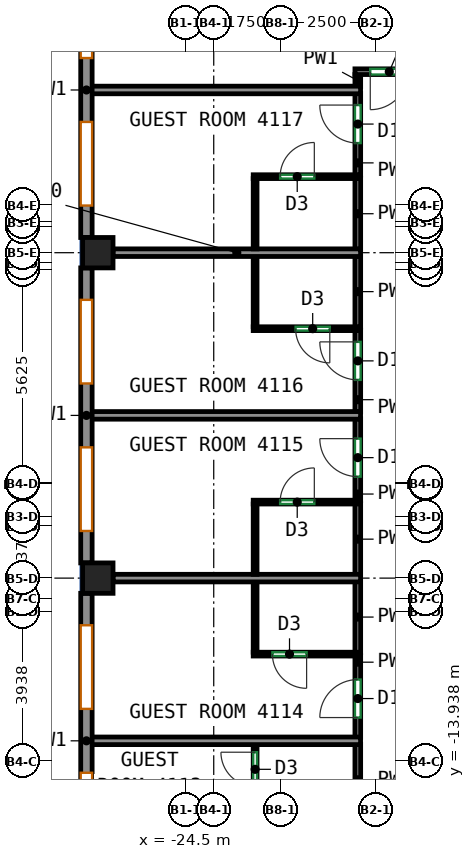
"""IFC4 building model, lengths in metres.
Left out: names, types, materials, properties, quantities, classifications, styles, units other than length and angle.
Written with IfcOpenShell. Run it as: python <this file> out.ifc"""

import sys

from ifc_helpers import new_model, si_unit, direction, frame, frame_2d, origin, origin_2d, place, context, subcontext, project, spatial, rectangle, extrude, source, transform, mapped, element, fill, save


model = new_model("IFC4")
c1 = context("Model", 3, precision=1e-05, world=origin(), true_north=direction((0.0, 1.0)))
c2 = subcontext(c1, "Body", "Model", "MODEL_VIEW")
j1 = project(units=[si_unit("LENGTHUNIT", "METRE"), si_unit("PLANEANGLEUNIT", "RADIAN")], contexts=[c1])
p1 = place(None, origin())
s1 = spatial("IfcSite", under=j1, at=p1, CompositionType="ELEMENT")
p2 = place(p1, origin())
s2 = spatial("IfcBuilding", under=s1, at=p2, CompositionType="ELEMENT")
p3 = place(p2, frame((0.0, 0.0, 175.3)))
s3 = spatial("IfcBuildingStorey", under=s2, at=p3, CompositionType="ELEMENT", Elevation=175.3)
m1 = source(origin(), c2, "Body", "SweptSolid", [
    extrude(rectangle(XDim=0.8, YDim=0.8, at=origin_2d()), origin(), (0.0, 0.0, 1.0), 3.12),
])
for number, where, z_axis, x_axis in (
    (1, (-26.8, -9.125, 0.0), (0.0, 0.0, 1.0), (1.0, 0.0, 0.0)),
    (2, (-26.8, -0.562, 0.0), (0.0, 0.0, 1.0), (1.0, 0.0, 0.0)),
):
    element("IfcColumn", number, at=place(p3, frame(where, z_axis=z_axis, x_axis=x_axis)), inside=s3, PredefinedType="COLUMN", context=c2, shape_type="MappedRepresentation", body=[
        mapped(m1, transform((0.0, 0.0, 0.0))),
    ])
m2 = source(origin(), c2, "Body", "SweptSolid", [
    extrude(rectangle(XDim=7.763, YDim=0.3, at=frame_2d((3.881, 0.0))), origin(), (0.0, 0.0, 1.0), 3.12),
])
p4 = place(p3, frame((-27.1, 7.6, 0.0), z_axis=(0.0, 0.0, 1.0), x_axis=(0.0, -1.0, 0.0)))
e3 = element("IfcWall", 3, at=p4, inside=s3, PredefinedType="SOLIDWALL", context=c2, shape_type="MappedRepresentation", body=[
    mapped(m2, transform((0.0, 0.0, 0.0))),
])
p5 = place(p4, frame((0.841, 0.0, 0.85)))
e4 = element("IfcOpeningElement", 4, at=p5, cuts=e3, PredefinedType="OPENING", context=c2, shape_type="SweptSolid", body=[
    extrude(rectangle(XDim=2.2, YDim=1.95, at=frame_2d((1.1, 0.975))), frame((0.0, 0.16, 0.0), z_axis=(0.0, -1.0, 0.0), x_axis=(1.0, 0.0, 0.0)), (0.0, 0.0, 1.0), 0.32),
])
p6 = place(p4, frame((4.722, 0.0, 0.85)))
e5 = element("IfcOpeningElement", 5, at=p6, cuts=e3, PredefinedType="OPENING", context=c2, shape_type="SweptSolid", body=[
    extrude(rectangle(XDim=2.2, YDim=1.95, at=frame_2d((1.1, 0.975))), frame((0.0, 0.16, 0.0), z_axis=(0.0, -1.0, 0.0), x_axis=(1.0, 0.0, 0.0)), (0.0, 0.0, 1.0), 0.32),
])
p7 = place(p3, frame((-27.1, -0.962, 0.0), z_axis=(0.0, 0.0, 1.0), x_axis=(0.0, -1.0, 0.0)))
e6 = element("IfcWall", 6, at=p7, inside=s3, PredefinedType="SOLIDWALL", context=c2, shape_type="MappedRepresentation", body=[
    mapped(m2, transform((0.0, 0.0, 0.0))),
])
p8 = place(p7, frame((0.841, 0.0, 0.85)))
e7 = element("IfcOpeningElement", 7, at=p8, cuts=e6, PredefinedType="OPENING", context=c2, shape_type="SweptSolid", body=[
    extrude(rectangle(XDim=2.2, YDim=1.95, at=frame_2d((1.1, 0.975))), frame((0.0, 0.16, 0.0), z_axis=(0.0, -1.0, 0.0), x_axis=(1.0, 0.0, 0.0)), (0.0, 0.0, 1.0), 0.32),
])
p9 = place(p7, frame((4.722, 0.0, 0.85)))
e8 = element("IfcOpeningElement", 8, at=p9, cuts=e6, PredefinedType="OPENING", context=c2, shape_type="SweptSolid", body=[
    extrude(rectangle(XDim=2.2, YDim=1.95, at=frame_2d((1.1, 0.975))), frame((0.0, 0.16, 0.0), z_axis=(0.0, -1.0, 0.0), x_axis=(1.0, 0.0, 0.0)), (0.0, 0.0, 1.0), 0.32),
])
p10 = place(p3, frame((-27.1, -9.525, 0.0), z_axis=(0.0, 0.0, 1.0), x_axis=(0.0, -1.0, 0.0)))
e9 = element("IfcWall", 9, at=p10, inside=s3, PredefinedType="SOLIDWALL", context=c2, shape_type="MappedRepresentation", body=[
    mapped(m2, transform((0.0, 0.0, 0.0))),
])
p11 = place(p10, frame((0.841, 0.0, 0.85)))
e10 = element("IfcOpeningElement", 10, at=p11, cuts=e9, PredefinedType="OPENING", context=c2, shape_type="SweptSolid", body=[
    extrude(rectangle(XDim=2.2, YDim=1.95, at=frame_2d((1.1, 0.975))), frame((0.0, 0.16, 0.0), z_axis=(0.0, -1.0, 0.0), x_axis=(1.0, 0.0, 0.0)), (0.0, 0.0, 1.0), 0.32),
])
p12 = place(p10, frame((4.722, 0.0, 0.85)))
e11 = element("IfcOpeningElement", 11, at=p12, cuts=e9, PredefinedType="OPENING", context=c2, shape_type="SweptSolid", body=[
    extrude(rectangle(XDim=2.2, YDim=1.95, at=frame_2d((1.1, 0.975))), frame((0.0, 0.16, 0.0), z_axis=(0.0, -1.0, 0.0), x_axis=(1.0, 0.0, 0.0)), (0.0, 0.0, 1.0), 0.32),
])
p13 = place(p3, frame((-19.959, -15.366, 0.0), z_axis=(0.0, 0.0, 1.0), x_axis=(0.0, 1.0, 0.0)))
e12 = element("IfcWall", 12, at=p13, inside=s3, PredefinedType="PARTITIONING", context=c2, shape_type="SweptSolid", body=[
    extrude(rectangle(XDim=1.87, YDim=0.15, at=frame_2d((0.935, 0.0))), origin(), (0.0, 0.0, 1.0), 3.12),
])
p14 = place(p3, frame((-19.959, -13.316, 0.0), z_axis=(0.0, 0.0, 1.0), x_axis=(0.0, 1.0, 0.0)))
e13 = element("IfcWall", 13, at=p14, inside=s3, PredefinedType="PARTITIONING", context=c2, shape_type="SweptSolid", body=[
    extrude(rectangle(XDim=2.151, YDim=0.15, at=frame_2d((1.075, 0.0))), origin(), (0.0, 0.0, 1.0), 3.12),
])
p15 = place(p14, frame((0.522, 0.0, 0.0)))
e14 = element("IfcOpeningElement", 14, at=p15, cuts=e13, PredefinedType="OPENING", context=c2, shape_type="SweptSolid", body=[
    extrude(rectangle(XDim=1.0, YDim=2.1, at=frame_2d((0.5, 1.05))), frame((0.0, 0.085, 0.0), z_axis=(0.0, -1.0, 0.0), x_axis=(1.0, 0.0, 0.0)), (0.0, 0.0, 1.0), 0.17),
])
p16 = place(p3, frame((-19.959, -11.085, 0.0), z_axis=(0.0, 0.0, 1.0), x_axis=(0.0, 1.0, 0.0)))
e15 = element("IfcWall", 15, at=p16, inside=s3, PredefinedType="PARTITIONING", context=c2, shape_type="SweptSolid", body=[
    extrude(rectangle(XDim=1.87, YDim=0.15, at=frame_2d((0.935, 0.0))), origin(), (0.0, 0.0, 1.0), 3.12),
])
p17 = place(p3, frame((-19.959, -7.085, 0.0), z_axis=(0.0, 0.0, 1.0), x_axis=(0.0, 1.0, 0.0)))
e16 = element("IfcWall", 16, at=p17, inside=s3, PredefinedType="PARTITIONING", context=c2, shape_type="SweptSolid", body=[
    extrude(rectangle(XDim=2.152, YDim=0.15, at=frame_2d((1.076, 0.0))), origin(), (0.0, 0.0, 1.0), 3.12),
])
p18 = place(p17, frame((0.63, 0.0, 0.0)))
e17 = element("IfcOpeningElement", 17, at=p18, cuts=e16, PredefinedType="OPENING", context=c2, shape_type="SweptSolid", body=[
    extrude(rectangle(XDim=1.0, YDim=2.1, at=frame_2d((0.5, 1.05))), frame((0.0, 0.085, 0.0), z_axis=(0.0, -1.0, 0.0), x_axis=(1.0, 0.0, 0.0)), (0.0, 0.0, 1.0), 0.17),
])
p19 = place(p3, frame((-19.959, -9.035, 0.0), z_axis=(0.0, 0.0, 1.0), x_axis=(0.0, 1.0, 0.0)))
e18 = element("IfcWall", 18, at=p19, inside=s3, PredefinedType="PARTITIONING", context=c2, shape_type="SweptSolid", body=[
    extrude(rectangle(XDim=1.87, YDim=0.15, at=frame_2d((0.935, 0.0))), origin(), (0.0, 0.0, 1.0), 3.12),
])
p20 = place(p3, frame((-19.959, -4.753, 0.0), z_axis=(0.0, 0.0, 1.0), x_axis=(0.0, 1.0, 0.0)))
e19 = element("IfcWall", 19, at=p20, inside=s3, PredefinedType="PARTITIONING", context=c2, shape_type="SweptSolid", body=[
    extrude(rectangle(XDim=2.151, YDim=0.15, at=frame_2d((1.075, 0.0))), origin(), (0.0, 0.0, 1.0), 3.12),
])
p21 = place(p20, frame((0.844, 0.0, 0.0)))
e20 = element("IfcOpeningElement", 20, at=p21, cuts=e19, PredefinedType="OPENING", context=c2, shape_type="SweptSolid", body=[
    extrude(rectangle(XDim=1.0, YDim=2.1, at=frame_2d((0.5, 1.05))), frame((0.0, 0.085, 0.0), z_axis=(0.0, -1.0, 0.0), x_axis=(1.0, 0.0, 0.0)), (0.0, 0.0, 1.0), 0.17),
])
p22 = place(p3, frame((-19.959, -2.522, 0.0), z_axis=(0.0, 0.0, 1.0), x_axis=(0.0, 1.0, 0.0)))
e21 = element("IfcWall", 21, at=p22, inside=s3, PredefinedType="PARTITIONING", context=c2, shape_type="SweptSolid", body=[
    extrude(rectangle(XDim=1.87, YDim=0.15, at=frame_2d((0.935, 0.0))), origin(), (0.0, 0.0, 1.0), 3.12),
])
p23 = place(p3, frame((-19.959, 1.478, 0.0), z_axis=(0.0, 0.0, 1.0), x_axis=(0.0, 1.0, 0.0)))
e22 = element("IfcWall", 22, at=p23, inside=s3, PredefinedType="PARTITIONING", context=c2, shape_type="SweptSolid", body=[
    extrude(rectangle(XDim=2.151, YDim=0.15, at=frame_2d((1.075, 0.0))), origin(), (0.0, 0.0, 1.0), 3.12),
])
p24 = place(p23, frame((0.844, 0.0, 0.0)))
e23 = element("IfcOpeningElement", 23, at=p24, cuts=e22, PredefinedType="OPENING", context=c2, shape_type="SweptSolid", body=[
    extrude(rectangle(XDim=1.0, YDim=2.1, at=frame_2d((0.5, 1.05))), frame((0.0, 0.085, 0.0), z_axis=(0.0, -1.0, 0.0), x_axis=(1.0, 0.0, 0.0)), (0.0, 0.0, 1.0), 0.17),
])
p25 = place(p3, frame((-19.959, -0.472, 0.0), z_axis=(0.0, 0.0, 1.0), x_axis=(0.0, 1.0, 0.0)))
e24 = element("IfcWall", 24, at=p25, inside=s3, PredefinedType="PARTITIONING", context=c2, shape_type="SweptSolid", body=[
    extrude(rectangle(XDim=1.87, YDim=0.15, at=frame_2d((0.935, 0.0))), origin(), (0.0, 0.0, 1.0), 3.12),
])
p26 = place(p3, frame((-19.959, 3.809, 0.0), z_axis=(0.0, 0.0, 1.0), x_axis=(0.0, 1.0, 0.0)))
e25 = element("IfcWall", 25, at=p26, inside=s3, PredefinedType="PARTITIONING", context=c2, shape_type="SweptSolid", body=[
    extrude(rectangle(XDim=0.316, YDim=0.15, at=frame_2d((0.158, 0.0))), origin(), (0.0, 0.0, 1.0), 3.12),
])
p27 = place(p3, frame((-17.925, 4.2, 0.0), z_axis=(0.0, 0.0, 1.0), x_axis=(-1.0, 0.0, 0.0)))
e26 = element("IfcWall", 26, at=p27, inside=s3, PredefinedType="PARTITIONING", context=c2, shape_type="SweptSolid", body=[
    extrude(rectangle(XDim=2.109, YDim=0.15, at=frame_2d((1.054, 0.0))), origin(), (0.0, 0.0, 1.0), 3.12),
])
p28 = place(p27, frame((0.706, 0.0, 0.0)))
e27 = element("IfcOpeningElement", 27, at=p28, cuts=e26, PredefinedType="OPENING", context=c2, shape_type="SweptSolid", body=[
    extrude(rectangle(XDim=1.0, YDim=2.1, at=frame_2d((0.5, 1.05))), frame((0.0, 0.085, 0.0), z_axis=(0.0, -1.0, 0.0), x_axis=(1.0, 0.0, 0.0)), (0.0, 0.0, 1.0), 0.17),
])
p29 = place(p3, frame((-22.661, -15.356, 0.0), z_axis=(0.0, 0.0, 1.0), x_axis=(0.0, 1.0, 0.0)))
e28 = element("IfcWall", 28, at=p29, inside=s3, PredefinedType="PARTITIONING", context=c2, shape_type="SweptSolid", body=[
    extrude(rectangle(XDim=1.85, YDim=0.1, at=frame_2d((0.925, 0.0))), origin(), (0.0, 0.0, 1.0), 3.12),
])
p30 = place(p29, frame((0.75, 0.0, 0.0)))
e29 = element("IfcOpeningElement", 29, at=p30, cuts=e28, PredefinedType="OPENING", context=c2, shape_type="SweptSolid", body=[
    extrude(rectangle(XDim=0.9, YDim=2.1, at=frame_2d((0.45, 1.05))), frame((0.0, 0.06, 0.0), z_axis=(0.0, -1.0, 0.0), x_axis=(1.0, 0.0, 0.0)), (0.0, 0.0, 1.0), 0.12),
])
p31 = place(p3, frame((-27.0, -13.406, 0.0), z_axis=(0.0, 0.0, 1.0), x_axis=(1.0, 0.0, 0.0)))
e30 = element("IfcWall", 30, at=p31, inside=s3, PredefinedType="PARTITIONING", context=c2, shape_type="SweptSolid", body=[
    extrude(rectangle(XDim=7.114, YDim=0.2, at=frame_2d((3.557, 0.0))), origin(), (0.0, 0.0, 1.0), 3.12),
])
p32 = place(p3, frame((-19.886, -11.125, 0.0), z_axis=(0.0, 0.0, 1.0), x_axis=(-1.0, 0.0, 0.0)))
e31 = element("IfcWall", 31, at=p32, inside=s3, PredefinedType="PARTITIONING", context=c2, shape_type="SweptSolid", body=[
    extrude(rectangle(XDim=2.825, YDim=0.1, at=frame_2d((1.413, 0.0))), origin(), (0.0, 0.0, 1.0), 3.12),
])
p33 = place(p32, frame((1.42, 0.0, 0.0)))
e32 = element("IfcOpeningElement", 32, at=p33, cuts=e31, PredefinedType="OPENING", context=c2, shape_type="SweptSolid", body=[
    extrude(rectangle(XDim=0.9, YDim=2.1, at=frame_2d((0.45, 1.05))), frame((0.0, 0.06, 0.0), z_axis=(0.0, -1.0, 0.0), x_axis=(1.0, 0.0, 0.0)), (0.0, 0.0, 1.0), 0.12),
])
p34 = place(p3, frame((-22.661, -11.075, 0.0), z_axis=(0.0, 0.0, 1.0), x_axis=(0.0, 1.0, 0.0)))
e33 = element("IfcWall", 33, at=p34, inside=s3, PredefinedType="PARTITIONING", context=c2, shape_type="SweptSolid", body=[
    extrude(rectangle(XDim=1.85, YDim=0.1, at=frame_2d((0.925, 0.0))), origin(), (0.0, 0.0, 1.0), 3.12),
])
p35 = place(p3, frame((-26.4, -9.125, 0.0), z_axis=(0.0, 0.0, 1.0), x_axis=(1.0, 0.0, 0.0)))
e34 = element("IfcWall", 34, at=p35, inside=s3, PredefinedType="PARTITIONING", context=c2, shape_type="SweptSolid", body=[
    extrude(rectangle(XDim=6.514, YDim=0.2, at=frame_2d((3.257, 0.0))), origin(), (0.0, 0.0, 1.0), 3.12),
])
p36 = place(p3, frame((-22.711, -7.125, 0.0), z_axis=(0.0, 0.0, 1.0), x_axis=(1.0, 0.0, 0.0)))
e35 = element("IfcWall", 35, at=p36, inside=s3, PredefinedType="PARTITIONING", context=c2, shape_type="SweptSolid", body=[
    extrude(rectangle(XDim=2.825, YDim=0.1, at=frame_2d((1.413, 0.0))), origin(), (0.0, 0.0, 1.0), 3.12),
])
p37 = place(p36, frame((0.708, 0.0, 0.0)))
e36 = element("IfcOpeningElement", 36, at=p37, cuts=e35, PredefinedType="OPENING", context=c2, shape_type="SweptSolid", body=[
    extrude(rectangle(XDim=0.9, YDim=2.1, at=frame_2d((0.45, 1.05))), frame((0.0, 0.06, 0.0), z_axis=(0.0, -1.0, 0.0), x_axis=(1.0, 0.0, 0.0)), (0.0, 0.0, 1.0), 0.12),
])
p38 = place(p3, frame((-22.661, -9.025, 0.0), z_axis=(0.0, 0.0, 1.0), x_axis=(0.0, 1.0, 0.0)))
e37 = element("IfcWall", 37, at=p38, inside=s3, PredefinedType="PARTITIONING", context=c2, shape_type="SweptSolid", body=[
    extrude(rectangle(XDim=1.85, YDim=0.1, at=frame_2d((0.925, 0.0))), origin(), (0.0, 0.0, 1.0), 3.12),
])
p39 = place(p3, frame((-27.0, -4.843, 0.0), z_axis=(0.0, 0.0, 1.0), x_axis=(1.0, 0.0, 0.0)))
e38 = element("IfcWall", 38, at=p39, inside=s3, PredefinedType="PARTITIONING", context=c2, shape_type="SweptSolid", body=[
    extrude(rectangle(XDim=7.114, YDim=0.2, at=frame_2d((3.557, 0.0))), origin(), (0.0, 0.0, 1.0), 3.12),
])
p40 = place(p3, frame((-19.886, -2.562, 0.0), z_axis=(0.0, 0.0, 1.0), x_axis=(-1.0, 0.0, 0.0)))
e39 = element("IfcWall", 39, at=p40, inside=s3, PredefinedType="PARTITIONING", context=c2, shape_type="SweptSolid", body=[
    extrude(rectangle(XDim=2.825, YDim=0.1, at=frame_2d((1.413, 0.0))), origin(), (0.0, 0.0, 1.0), 3.12),
])
p41 = place(p40, frame((0.81, 0.0, 0.0)))
e40 = element("IfcOpeningElement", 40, at=p41, cuts=e39, PredefinedType="OPENING", context=c2, shape_type="SweptSolid", body=[
    extrude(rectangle(XDim=0.9, YDim=2.1, at=frame_2d((0.45, 1.05))), frame((0.0, 0.06, 0.0), z_axis=(0.0, -1.0, 0.0), x_axis=(1.0, 0.0, 0.0)), (0.0, 0.0, 1.0), 0.12),
])
p42 = place(p3, frame((-22.661, -2.512, 0.0), z_axis=(0.0, 0.0, 1.0), x_axis=(0.0, 1.0, 0.0)))
e41 = element("IfcWall", 41, at=p42, inside=s3, PredefinedType="PARTITIONING", context=c2, shape_type="SweptSolid", body=[
    extrude(rectangle(XDim=1.85, YDim=0.1, at=frame_2d((0.925, 0.0))), origin(), (0.0, 0.0, 1.0), 3.12),
])
p43 = place(p3, frame((-26.4, -0.562, 0.0), z_axis=(0.0, 0.0, 1.0), x_axis=(1.0, 0.0, 0.0)))
e42 = element("IfcWall", 42, at=p43, inside=s3, PredefinedType="PARTITIONING", context=c2, shape_type="SweptSolid", body=[
    extrude(rectangle(XDim=6.514, YDim=0.2, at=frame_2d((3.257, 0.0))), origin(), (0.0, 0.0, 1.0), 2.52),
])
p44 = place(p3, frame((-22.711, 1.438, 0.0), z_axis=(0.0, 0.0, 1.0), x_axis=(1.0, 0.0, 0.0)))
e43 = element("IfcWall", 43, at=p44, inside=s3, PredefinedType="PARTITIONING", context=c2, shape_type="SweptSolid", body=[
    extrude(rectangle(XDim=2.825, YDim=0.1, at=frame_2d((1.413, 0.0))), origin(), (0.0, 0.0, 1.0), 3.12),
])
p45 = place(p44, frame((0.708, 0.0, 0.0)))
e44 = element("IfcOpeningElement", 44, at=p45, cuts=e43, PredefinedType="OPENING", context=c2, shape_type="SweptSolid", body=[
    extrude(rectangle(XDim=0.9, YDim=2.1, at=frame_2d((0.45, 1.05))), frame((0.0, 0.06, 0.0), z_axis=(0.0, -1.0, 0.0), x_axis=(1.0, 0.0, 0.0)), (0.0, 0.0, 1.0), 0.12),
])
p46 = place(p3, frame((-22.661, -0.462, 0.0), z_axis=(0.0, 0.0, 1.0), x_axis=(0.0, 1.0, 0.0)))
e45 = element("IfcWall", 45, at=p46, inside=s3, PredefinedType="PARTITIONING", context=c2, shape_type="SweptSolid", body=[
    extrude(rectangle(XDim=1.85, YDim=0.1, at=frame_2d((0.925, 0.0))), origin(), (0.0, 0.0, 1.0), 3.12),
])
p47 = place(p3, frame((-27.0, 3.719, 0.0), z_axis=(0.0, 0.0, 1.0), x_axis=(1.0, 0.0, 0.0)))
e46 = element("IfcWall", 46, at=p47, inside=s3, PredefinedType="PARTITIONING", context=c2, shape_type="SweptSolid", body=[
    extrude(rectangle(XDim=7.114, YDim=0.2, at=frame_2d((3.557, 0.0))), origin(), (0.0, 0.0, 1.0), 3.12),
])
p48 = place(p5, origin())
e47 = element("IfcWindow", 47, at=p48, inside=s3, PartitioningType="SINGLE_PANEL", PredefinedType="WINDOW", context=c2, shape_type="SweptSolid", body=[
    extrude(rectangle(XDim=2.2, YDim=1.95, at=frame_2d((1.1, 0.975))), frame((0.0, 0.03, 0.0), z_axis=(0.0, -1.0, 0.0), x_axis=(1.0, 0.0, 0.0)), (0.0, 0.0, 1.0), 0.06),
])
fill(e4, e47)
p49 = place(p6, origin())
e48 = element("IfcWindow", 48, at=p49, inside=s3, PartitioningType="SINGLE_PANEL", PredefinedType="WINDOW", context=c2, shape_type="SweptSolid", body=[
    extrude(rectangle(XDim=2.2, YDim=1.95, at=frame_2d((1.1, 0.975))), frame((0.0, 0.03, 0.0), z_axis=(0.0, -1.0, 0.0), x_axis=(1.0, 0.0, 0.0)), (0.0, 0.0, 1.0), 0.06),
])
fill(e5, e48)
p50 = place(p8, origin())
e49 = element("IfcWindow", 49, at=p50, inside=s3, PartitioningType="SINGLE_PANEL", PredefinedType="WINDOW", context=c2, shape_type="SweptSolid", body=[
    extrude(rectangle(XDim=2.2, YDim=1.95, at=frame_2d((1.1, 0.975))), frame((0.0, 0.03, 0.0), z_axis=(0.0, -1.0, 0.0), x_axis=(1.0, 0.0, 0.0)), (0.0, 0.0, 1.0), 0.06),
])
fill(e7, e49)
p51 = place(p9, origin())
e50 = element("IfcWindow", 50, at=p51, inside=s3, PartitioningType="SINGLE_PANEL", PredefinedType="WINDOW", context=c2, shape_type="SweptSolid", body=[
    extrude(rectangle(XDim=2.2, YDim=1.95, at=frame_2d((1.1, 0.975))), frame((0.0, 0.03, 0.0), z_axis=(0.0, -1.0, 0.0), x_axis=(1.0, 0.0, 0.0)), (0.0, 0.0, 1.0), 0.06),
])
fill(e8, e50)
p52 = place(p11, origin())
e51 = element("IfcWindow", 51, at=p52, inside=s3, PartitioningType="SINGLE_PANEL", PredefinedType="WINDOW", context=c2, shape_type="SweptSolid", body=[
    extrude(rectangle(XDim=2.2, YDim=1.95, at=frame_2d((1.1, 0.975))), frame((0.0, 0.03, 0.0), z_axis=(0.0, -1.0, 0.0), x_axis=(1.0, 0.0, 0.0)), (0.0, 0.0, 1.0), 0.06),
])
fill(e10, e51)
p53 = place(p12, origin())
e52 = element("IfcWindow", 52, at=p53, inside=s3, PartitioningType="SINGLE_PANEL", PredefinedType="WINDOW", context=c2, shape_type="SweptSolid", body=[
    extrude(rectangle(XDim=2.2, YDim=1.95, at=frame_2d((1.1, 0.975))), frame((0.0, 0.03, 0.0), z_axis=(0.0, -1.0, 0.0), x_axis=(1.0, 0.0, 0.0)), (0.0, 0.0, 1.0), 0.06),
])
fill(e11, e52)
p54 = place(p30, origin())
e53 = element("IfcDoor", 53, at=p54, inside=s3, OperationType="SINGLE_SWING_RIGHT", PredefinedType="DOOR", context=c2, shape_type="SweptSolid", body=[
    extrude(rectangle(XDim=0.9, YDim=2.1, at=frame_2d((0.45, 1.05))), frame((0.0, 0.025, 0.0), z_axis=(0.0, -1.0, 0.0), x_axis=(1.0, 0.0, 0.0)), (0.0, 0.0, 1.0), 0.05),
])
fill(e29, e53)
p55 = place(p15, origin())
e54 = element("IfcDoor", 54, at=p55, inside=s3, OperationType="SINGLE_SWING_LEFT", PredefinedType="DOOR", context=c2, shape_type="SweptSolid", body=[
    extrude(rectangle(XDim=1.0, YDim=2.1, at=frame_2d((0.5, 1.05))), frame((0.0, 0.025, 0.0), z_axis=(0.0, -1.0, 0.0), x_axis=(1.0, 0.0, 0.0)), (0.0, 0.0, 1.0), 0.05),
])
fill(e14, e54)
p56 = place(p33, origin())
e55 = element("IfcDoor", 55, at=p56, inside=s3, OperationType="SINGLE_SWING_LEFT", PredefinedType="DOOR", context=c2, shape_type="SweptSolid", body=[
    extrude(rectangle(XDim=0.9, YDim=2.1, at=frame_2d((0.45, 1.05))), frame((0.0, 0.025, 0.0), z_axis=(0.0, -1.0, 0.0), x_axis=(1.0, 0.0, 0.0)), (0.0, 0.0, 1.0), 0.05),
])
fill(e32, e55)
p57 = place(p37, origin())
e56 = element("IfcDoor", 56, at=p57, inside=s3, OperationType="SINGLE_SWING_RIGHT", PredefinedType="DOOR", context=c2, shape_type="SweptSolid", body=[
    extrude(rectangle(XDim=0.9, YDim=2.1, at=frame_2d((0.45, 1.05))), frame((0.0, 0.025, 0.0), z_axis=(0.0, -1.0, 0.0), x_axis=(1.0, 0.0, 0.0)), (0.0, 0.0, 1.0), 0.05),
])
fill(e36, e56)
p58 = place(p18, origin())
e57 = element("IfcDoor", 57, at=p58, inside=s3, OperationType="SINGLE_SWING_RIGHT", PredefinedType="DOOR", context=c2, shape_type="SweptSolid", body=[
    extrude(rectangle(XDim=1.0, YDim=2.1, at=frame_2d((0.5, 1.05))), frame((0.0, 0.025, 0.0), z_axis=(0.0, -1.0, 0.0), x_axis=(1.0, 0.0, 0.0)), (0.0, 0.0, 1.0), 0.05),
])
fill(e17, e57)
p59 = place(p21, origin())
e58 = element("IfcDoor", 58, at=p59, inside=s3, OperationType="SINGLE_SWING_RIGHT", PredefinedType="DOOR", context=c2, shape_type="SweptSolid", body=[
    extrude(rectangle(XDim=1.0, YDim=2.1, at=frame_2d((0.5, 1.05))), frame((0.0, 0.025, 0.0), z_axis=(0.0, -1.0, 0.0), x_axis=(1.0, 0.0, 0.0)), (0.0, 0.0, 1.0), 0.05),
])
fill(e20, e58)
p60 = place(p41, origin())
e59 = element("IfcDoor", 59, at=p60, inside=s3, OperationType="SINGLE_SWING_LEFT", PredefinedType="DOOR", context=c2, shape_type="SweptSolid", body=[
    extrude(rectangle(XDim=0.9, YDim=2.1, at=frame_2d((0.45, 1.05))), frame((0.0, 0.025, 0.0), z_axis=(0.0, -1.0, 0.0), x_axis=(1.0, 0.0, 0.0)), (0.0, 0.0, 1.0), 0.05),
])
fill(e40, e59)
p61 = place(p45, origin())
e60 = element("IfcDoor", 60, at=p61, inside=s3, OperationType="SINGLE_SWING_RIGHT", PredefinedType="DOOR", context=c2, shape_type="SweptSolid", body=[
    extrude(rectangle(XDim=0.9, YDim=2.1, at=frame_2d((0.45, 1.05))), frame((0.0, 0.025, 0.0), z_axis=(0.0, -1.0, 0.0), x_axis=(1.0, 0.0, 0.0)), (0.0, 0.0, 1.0), 0.05),
])
fill(e44, e60)
p62 = place(p24, origin())
e61 = element("IfcDoor", 61, at=p62, inside=s3, OperationType="SINGLE_SWING_RIGHT", PredefinedType="DOOR", context=c2, shape_type="SweptSolid", body=[
    extrude(rectangle(XDim=1.0, YDim=2.1, at=frame_2d((0.5, 1.05))), frame((0.0, 0.025, 0.0), z_axis=(0.0, -1.0, 0.0), x_axis=(1.0, 0.0, 0.0)), (0.0, 0.0, 1.0), 0.05),
])
fill(e23, e61)
p63 = place(p28, origin())
e62 = element("IfcDoor", 62, at=p63, inside=s3, OperationType="SINGLE_SWING_RIGHT", PredefinedType="DOOR", context=c2, shape_type="SweptSolid", body=[
    extrude(rectangle(XDim=1.0, YDim=2.1, at=frame_2d((0.5, 1.05))), frame((0.0, 0.025, 0.0), z_axis=(0.0, -1.0, 0.0), x_axis=(1.0, 0.0, 0.0)), (0.0, 0.0, 1.0), 0.05),
])
fill(e27, e62)
save(model, sys.argv[1])
